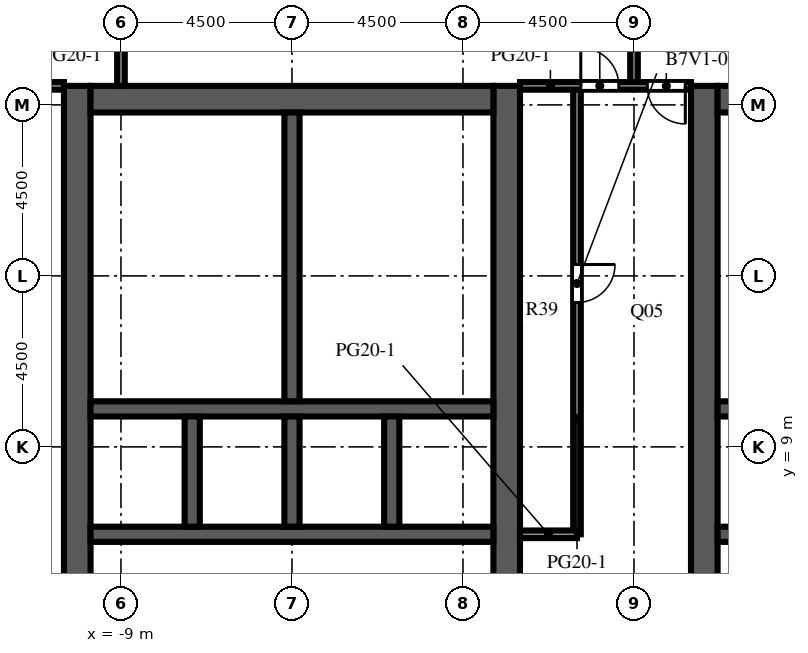
"""IFC4 building model, lengths in metres.
Left out: names, types, materials, properties, quantities, classifications, styles, units other than length and angle.
Written with IfcOpenShell. Run it as: python <this file> out.ifc"""

import sys

from ifc_helpers import new_model, si_unit, direction, frame, frame_2d, origin, place, context, subcontext, project, spatial, rectangle, extrude, element, fill, save


model = new_model("IFC4")
c1 = context("Model", 3, precision=1e-05, world=origin(), true_north=direction((0.0, 1.0)))
c2 = subcontext(c1, "Body", "Model", "MODEL_VIEW")
j1 = project(units=[si_unit("LENGTHUNIT", "METRE"), si_unit("PLANEANGLEUNIT", "RADIAN")], contexts=[c1])
p1 = place(None, origin())
s1 = spatial("IfcSite", under=j1, at=p1, CompositionType="ELEMENT")
p2 = place(p1, origin())
s2 = spatial("IfcBuilding", under=s1, at=p2, CompositionType="ELEMENT")
p3 = place(p2, frame((0.0, 0.0, 248.0)))
s3 = spatial("IfcBuildingStorey", under=s2, at=p3, CompositionType="ELEMENT", Elevation=248.0)
p4 = place(p3, frame((-10.15, -9.0, 0.0), z_axis=(0.0, 0.0, 1.0), x_axis=(0.0, 1.0, 0.0)))
e1 = element("IfcWall", 1, at=p4, inside=s3, PredefinedType="SHEAR", context=c2, shape_type="SweptSolid", body=[
    extrude(rectangle(XDim=27.5, YDim=0.7, at=frame_2d((13.75, 0.0))), origin(), (0.0, 0.0, 1.0), 4.1),
])
p5 = place(p4, frame((12.55, 0.0, 0.0)))
e2 = element("IfcOpeningElement", 2, at=p5, cuts=e1, PredefinedType="OPENING", context=c2, shape_type="SweptSolid", body=[
    extrude(rectangle(XDim=2.4, YDim=2.4, at=frame_2d((1.2, 1.2))), frame((0.0, 0.36, 0.0), z_axis=(0.0, -1.0, 0.0), x_axis=(1.0, 0.0, 0.0)), (0.0, 0.0, 1.0), 0.72),
])
p6 = place(p4, frame((6.825, 0.0, 0.0)))
e3 = element("IfcOpeningElement", 3, at=p6, cuts=e1, PredefinedType="OPENING", context=c2, shape_type="SweptSolid", body=[
    extrude(rectangle(XDim=1.2, YDim=2.1, at=frame_2d((0.6, 1.05))), frame((0.0, 0.36, 0.0), z_axis=(0.0, -1.0, 0.0), x_axis=(1.0, 0.0, 0.0)), (0.0, 0.0, 1.0), 0.72),
])
p7 = place(p4, frame((19.475, 0.0, 0.0)))
e4 = element("IfcOpeningElement", 4, at=p7, cuts=e1, PredefinedType="OPENING", context=c2, shape_type="SweptSolid", body=[
    extrude(rectangle(XDim=1.2, YDim=2.1, at=frame_2d((0.6, 1.05))), frame((0.0, 0.36, 0.0), z_axis=(0.0, -1.0, 0.0), x_axis=(1.0, 0.0, 0.0)), (0.0, 0.0, 1.0), 0.72),
])
p8 = place(p3, frame((1.15, -9.0, 0.0), z_axis=(0.0, 0.0, 1.0), x_axis=(0.0, 1.0, 0.0)))
e5 = element("IfcWall", 5, at=p8, inside=s3, PredefinedType="SHEAR", context=c2, shape_type="SweptSolid", body=[
    extrude(rectangle(XDim=27.5, YDim=0.7, at=frame_2d((13.75, 0.0))), origin(), (0.0, 0.0, 1.0), 4.1),
])
p9 = place(p8, frame((12.55, 0.0, 0.0)))
e6 = element("IfcOpeningElement", 6, at=p9, cuts=e5, PredefinedType="OPENING", context=c2, shape_type="SweptSolid", body=[
    extrude(rectangle(XDim=2.4, YDim=2.4, at=frame_2d((1.2, 1.2))), frame((0.0, 0.36, 0.0), z_axis=(0.0, -1.0, 0.0), x_axis=(1.0, 0.0, 0.0)), (0.0, 0.0, 1.0), 0.72),
])
p10 = place(p8, frame((3.9, 0.0, 0.0)))
e7 = element("IfcOpeningElement", 7, at=p10, cuts=e5, PredefinedType="OPENING", context=c2, shape_type="SweptSolid", body=[
    extrude(rectangle(XDim=1.2, YDim=2.1, at=frame_2d((0.6, 1.05))), frame((0.0, 0.36, 0.0), z_axis=(0.0, -1.0, 0.0), x_axis=(1.0, 0.0, 0.0)), (0.0, 0.0, 1.0), 0.72),
])
p11 = place(p8, frame((22.4, 0.0, 0.0)))
e8 = element("IfcOpeningElement", 8, at=p11, cuts=e5, PredefinedType="OPENING", context=c2, shape_type="SweptSolid", body=[
    extrude(rectangle(XDim=1.2, YDim=2.1, at=frame_2d((0.6, 1.05))), frame((0.0, 0.36, 0.0), z_axis=(0.0, -1.0, 0.0), x_axis=(1.0, 0.0, 0.0)), (0.0, 0.0, 1.0), 0.72),
])
p12 = place(p3, frame((-9.8, 18.15, 0.0), z_axis=(0.0, 0.0, 1.0), x_axis=(1.0, 0.0, 0.0)))
e9 = element("IfcWall", 9, at=p12, inside=s3, PredefinedType="SHEAR", context=c2, shape_type="SweptSolid", body=[
    extrude(rectangle(XDim=10.6, YDim=0.7, at=frame_2d((5.3, 0.0))), origin(), (0.0, 0.0, 1.0), 4.1),
])
p13 = place(p3, frame((-9.8, 6.7, 0.0), z_axis=(0.0, 0.0, 1.0), x_axis=(1.0, 0.0, 0.0)))
e10 = element("IfcWall", 10, at=p13, inside=s3, PredefinedType="SHEAR", context=c2, shape_type="SweptSolid", body=[
    extrude(rectangle(XDim=10.6, YDim=0.4, at=frame_2d((5.3, 0.0))), origin(), (0.0, 0.0, 1.0), 4.1),
])
p14 = place(p13, frame((3.438, 0.0, 0.0)))
e11 = element("IfcOpeningElement", 11, at=p14, cuts=e10, PredefinedType="OPENING", context=c2, shape_type="SweptSolid", body=[
    extrude(rectangle(XDim=1.1, YDim=2.1, at=frame_2d((0.55, 1.05))), frame((0.0, 0.21, 0.0), z_axis=(0.0, -1.0, 0.0), x_axis=(1.0, 0.0, 0.0)), (0.0, 0.0, 1.0), 0.42),
])
p15 = place(p13, frame((6.062, 0.0, 0.0)))
e12 = element("IfcOpeningElement", 12, at=p15, cuts=e10, PredefinedType="OPENING", context=c2, shape_type="SweptSolid", body=[
    extrude(rectangle(XDim=1.1, YDim=2.1, at=frame_2d((0.55, 1.05))), frame((0.0, 0.21, 0.0), z_axis=(0.0, -1.0, 0.0), x_axis=(1.0, 0.0, 0.0)), (0.0, 0.0, 1.0), 0.42),
])
p16 = place(p13, frame((8.812, 0.0, 0.0)))
e13 = element("IfcOpeningElement", 13, at=p16, cuts=e10, PredefinedType="OPENING", context=c2, shape_type="SweptSolid", body=[
    extrude(rectangle(XDim=1.1, YDim=2.1, at=frame_2d((0.55, 1.05))), frame((0.0, 0.21, 0.0), z_axis=(0.0, -1.0, 0.0), x_axis=(1.0, 0.0, 0.0)), (0.0, 0.0, 1.0), 0.42),
])
p17 = place(p13, frame((0.738, 0.0, 0.0)))
e14 = element("IfcOpeningElement", 14, at=p17, cuts=e10, PredefinedType="OPENING", context=c2, shape_type="SweptSolid", body=[
    extrude(rectangle(XDim=1.0, YDim=2.1, at=frame_2d((0.5, 1.05))), frame((0.0, 0.21, 0.0), z_axis=(0.0, -1.0, 0.0), x_axis=(1.0, 0.0, 0.0)), (0.0, 0.0, 1.0), 0.42),
])
p18 = place(p3, frame((-9.8, 10.0, 0.0), z_axis=(0.0, 0.0, 1.0), x_axis=(1.0, 0.0, 0.0)))
e15 = element("IfcWall", 15, at=p18, inside=s3, PredefinedType="SHEAR", context=c2, shape_type="SweptSolid", body=[
    extrude(rectangle(XDim=10.6, YDim=0.4, at=frame_2d((5.3, 0.0))), origin(), (0.0, 0.0, 1.0), 4.1),
])
for number, where, z_axis, x_axis in (
    (16, (-7.125, 6.9, 0.0), (0.0, 0.0, 1.0), (0.0, 1.0, 0.0)),
    (17, (-4.5, 6.9, 0.0), (0.0, 0.0, 1.0), (0.0, 1.0, 0.0)),
    (18, (-1.875, 6.9, 0.0), (0.0, 0.0, 1.0), (0.0, 1.0, 0.0)),
):
    element("IfcWall", number, at=place(p3, frame(where, z_axis=z_axis, x_axis=x_axis)), inside=s3, PredefinedType="SHEAR", context=c2, shape_type="SweptSolid", body=[
        extrude(rectangle(XDim=2.9, YDim=0.4, at=frame_2d((1.45, 0.0))), origin(), (0.0, 0.0, 1.0), 4.1),
    ])
p19 = place(p3, frame((-4.5, 10.2, 0.0), z_axis=(0.0, 0.0, 1.0), x_axis=(0.0, 1.0, 0.0)))
e19 = element("IfcWall", 19, at=p19, inside=s3, PredefinedType="SHEAR", context=c2, shape_type="SweptSolid", body=[
    extrude(rectangle(XDim=7.6, YDim=0.4, at=frame_2d((3.8, 0.0))), origin(), (0.0, 0.0, 1.0), 4.1),
])
p20 = place(p3, frame((6.35, -9.0, 0.0), z_axis=(0.0, 0.0, 1.0), x_axis=(0.0, 1.0, 0.0)))
e20 = element("IfcWall", 20, at=p20, inside=s3, PredefinedType="SHEAR", context=c2, shape_type="SweptSolid", body=[
    extrude(rectangle(XDim=27.5, YDim=0.7, at=frame_2d((13.75, 0.0))), origin(), (0.0, 0.0, 1.0), 4.1),
])
p21 = place(p20, frame((12.55, 0.0, 0.0)))
e21 = element("IfcOpeningElement", 21, at=p21, cuts=e20, PredefinedType="OPENING", context=c2, shape_type="SweptSolid", body=[
    extrude(rectangle(XDim=2.4, YDim=2.4, at=frame_2d((1.2, 1.2))), frame((0.0, 0.36, 0.0), z_axis=(0.0, -1.0, 0.0), x_axis=(1.0, 0.0, 0.0)), (0.0, 0.0, 1.0), 0.72),
])
p22 = place(p20, frame((3.9, 0.0, 0.0)))
e22 = element("IfcOpeningElement", 22, at=p22, cuts=e20, PredefinedType="OPENING", context=c2, shape_type="SweptSolid", body=[
    extrude(rectangle(XDim=1.2, YDim=2.1, at=frame_2d((0.6, 1.05))), frame((0.0, 0.36, 0.0), z_axis=(0.0, -1.0, 0.0), x_axis=(1.0, 0.0, 0.0)), (0.0, 0.0, 1.0), 0.72),
])
p23 = place(p20, frame((22.4, 0.0, 0.0)))
e23 = element("IfcOpeningElement", 23, at=p23, cuts=e20, PredefinedType="OPENING", context=c2, shape_type="SweptSolid", body=[
    extrude(rectangle(XDim=1.2, YDim=2.1, at=frame_2d((0.6, 1.05))), frame((0.0, 0.36, 0.0), z_axis=(0.0, -1.0, 0.0), x_axis=(1.0, 0.0, 0.0)), (0.0, 0.0, 1.0), 0.72),
])
p24 = place(p3, frame((6.7, 18.15, 0.0), z_axis=(0.0, 0.0, 1.0), x_axis=(1.0, 0.0, 0.0)))
e24 = element("IfcWall", 24, at=p24, inside=s3, PredefinedType="SHEAR", context=c2, shape_type="SweptSolid", body=[
    extrude(rectangle(XDim=10.6, YDim=0.7, at=frame_2d((5.3, 0.0))), origin(), (0.0, 0.0, 1.0), 4.1),
])
p25 = place(p3, frame((6.7, 6.7, 0.0), z_axis=(0.0, 0.0, 1.0), x_axis=(1.0, 0.0, 0.0)))
e25 = element("IfcWall", 25, at=p25, inside=s3, PredefinedType="SHEAR", context=c2, shape_type="SweptSolid", body=[
    extrude(rectangle(XDim=10.6, YDim=0.4, at=frame_2d((5.3, 0.0))), origin(), (0.0, 0.0, 1.0), 4.1),
])
p26 = place(p25, frame((3.438, 0.0, 0.0)))
e26 = element("IfcOpeningElement", 26, at=p26, cuts=e25, PredefinedType="OPENING", context=c2, shape_type="SweptSolid", body=[
    extrude(rectangle(XDim=1.1, YDim=2.1, at=frame_2d((0.55, 1.05))), frame((0.0, 0.21, 0.0), z_axis=(0.0, -1.0, 0.0), x_axis=(1.0, 0.0, 0.0)), (0.0, 0.0, 1.0), 0.42),
])
p27 = place(p25, frame((6.062, 0.0, 0.0)))
e27 = element("IfcOpeningElement", 27, at=p27, cuts=e25, PredefinedType="OPENING", context=c2, shape_type="SweptSolid", body=[
    extrude(rectangle(XDim=1.1, YDim=2.1, at=frame_2d((0.55, 1.05))), frame((0.0, 0.21, 0.0), z_axis=(0.0, -1.0, 0.0), x_axis=(1.0, 0.0, 0.0)), (0.0, 0.0, 1.0), 0.42),
])
p28 = place(p25, frame((8.812, 0.0, 0.0)))
e28 = element("IfcOpeningElement", 28, at=p28, cuts=e25, PredefinedType="OPENING", context=c2, shape_type="SweptSolid", body=[
    extrude(rectangle(XDim=1.1, YDim=2.1, at=frame_2d((0.55, 1.05))), frame((0.0, 0.21, 0.0), z_axis=(0.0, -1.0, 0.0), x_axis=(1.0, 0.0, 0.0)), (0.0, 0.0, 1.0), 0.42),
])
p29 = place(p25, frame((0.738, 0.0, 0.0)))
e29 = element("IfcOpeningElement", 29, at=p29, cuts=e25, PredefinedType="OPENING", context=c2, shape_type="SweptSolid", body=[
    extrude(rectangle(XDim=1.0, YDim=2.1, at=frame_2d((0.5, 1.05))), frame((0.0, 0.21, 0.0), z_axis=(0.0, -1.0, 0.0), x_axis=(1.0, 0.0, 0.0)), (0.0, 0.0, 1.0), 0.42),
])
p30 = place(p3, frame((6.7, 10.0, 0.0), z_axis=(0.0, 0.0, 1.0), x_axis=(1.0, 0.0, 0.0)))
e30 = element("IfcWall", 30, at=p30, inside=s3, PredefinedType="SHEAR", context=c2, shape_type="SweptSolid", body=[
    extrude(rectangle(XDim=10.6, YDim=0.4, at=frame_2d((5.3, 0.0))), origin(), (0.0, 0.0, 1.0), 4.1),
])
p31 = place(p3, frame((-0.6, 10.2, 0.0), z_axis=(0.0, 0.0, 1.0), x_axis=(0.0, 1.0, 0.0)))
e31 = element("IfcWall", 31, at=p31, inside=s3, PredefinedType="PARTITIONING", context=c2, shape_type="SweptSolid", body=[
    extrude(rectangle(XDim=2.28, YDim=0.1, at=frame_2d((1.14, 0.0))), origin(), (0.0, 0.0, 1.0), 3.65),
])
p32 = place(p31, frame((0.64, 0.0, 0.0)))
e32 = element("IfcOpeningElement", 32, at=p32, cuts=e31, PredefinedType="OPENING", context=c2, shape_type="SweptSolid", body=[
    extrude(rectangle(XDim=1.0, YDim=2.1, at=frame_2d((0.5, 1.05))), frame((0.0, 0.06, 0.0), z_axis=(0.0, -1.0, 0.0), x_axis=(1.0, 0.0, 0.0)), (0.0, 0.0, 1.0), 0.12),
])
p33 = place(p3, frame((-0.6, 12.48, 0.0), z_axis=(0.0, 0.0, 1.0), x_axis=(0.0, 1.0, 0.0)))
e33 = element("IfcWall", 33, at=p33, inside=s3, PredefinedType="PARTITIONING", context=c2, shape_type="SweptSolid", body=[
    extrude(rectangle(XDim=2.432, YDim=0.1, at=frame_2d((1.216, 0.0))), origin(), (0.0, 0.0, 1.0), 3.65),
])
p34 = place(p33, frame((0.716, 0.0, 0.0)))
e34 = element("IfcOpeningElement", 34, at=p34, cuts=e33, PredefinedType="OPENING", context=c2, shape_type="SweptSolid", body=[
    extrude(rectangle(XDim=1.0, YDim=2.1, at=frame_2d((0.5, 1.05))), frame((0.0, 0.06, 0.0), z_axis=(0.0, -1.0, 0.0), x_axis=(1.0, 0.0, 0.0)), (0.0, 0.0, 1.0), 0.12),
])
p35 = place(p3, frame((-0.6, 14.912, 0.0), z_axis=(0.0, 0.0, 1.0), x_axis=(0.0, 1.0, 0.0)))
e35 = element("IfcWall", 35, at=p35, inside=s3, PredefinedType="PARTITIONING", context=c2, shape_type="SweptSolid", body=[
    extrude(rectangle(XDim=2.888, YDim=0.1, at=frame_2d((1.444, 0.0))), origin(), (0.0, 0.0, 1.0), 3.65),
])
p36 = place(p35, frame((0.944, 0.0, 0.0)))
e36 = element("IfcOpeningElement", 36, at=p36, cuts=e35, PredefinedType="OPENING", context=c2, shape_type="SweptSolid", body=[
    extrude(rectangle(XDim=1.0, YDim=2.1, at=frame_2d((0.5, 1.05))), frame((0.0, 0.06, 0.0), z_axis=(0.0, -1.0, 0.0), x_axis=(1.0, 0.0, 0.0)), (0.0, 0.0, 1.0), 0.12),
])
for number, where, z_axis, x_axis in (
    (37, (-4.3, 12.48, 0.0), (0.0, 0.0, 1.0), (1.0, 0.0, 0.0)),
    (38, (-4.3, 14.912, 0.0), (0.0, 0.0, 1.0), (1.0, 0.0, 0.0)),
):
    element("IfcWall", number, at=place(p3, frame(where, z_axis=z_axis, x_axis=x_axis)), inside=s3, PredefinedType="PARTITIONING", context=c2, shape_type="SweptSolid", body=[
        extrude(rectangle(XDim=3.7, YDim=0.1, at=frame_2d((1.85, 0.0))), origin(), (0.0, 0.0, 1.0), 3.65),
    ])
p37 = place(p3, frame((-9.0, 18.5, 0.0), z_axis=(0.0, 0.0, 1.0), x_axis=(0.0, 1.0, 0.0)))
e39 = element("IfcWall", 39, at=p37, inside=s3, PredefinedType="PARTITIONING", context=c2, shape_type="SweptSolid", body=[
    extrude(rectangle(XDim=3.5, YDim=0.2, at=frame_2d((1.75, 0.0))), origin(), (0.0, 0.0, 1.0), 3.65),
])
p38 = place(p3, frame((3.0, 6.7, 0.0), z_axis=(0.0, 0.0, 1.0), x_axis=(0.0, 1.0, 0.0)))
e40 = element("IfcWall", 40, at=p38, inside=s3, PredefinedType="PARTITIONING", context=c2, shape_type="SweptSolid", body=[
    extrude(rectangle(XDim=11.8, YDim=0.2, at=frame_2d((5.9, 0.0))), origin(), (0.0, 0.0, 1.0), 3.65),
])
p39 = place(p38, frame((6.1, 0.0, 0.0)))
e41 = element("IfcOpeningElement", 41, at=p39, cuts=e40, PredefinedType="OPENING", context=c2, shape_type="SweptSolid", body=[
    extrude(rectangle(XDim=1.0, YDim=2.1, at=frame_2d((0.5, 1.05))), frame((0.0, 0.11, 0.0), z_axis=(0.0, -1.0, 0.0), x_axis=(1.0, 0.0, 0.0)), (0.0, 0.0, 1.0), 0.22),
])
p40 = place(p3, frame((4.5, 18.5, 0.0), z_axis=(0.0, 0.0, 1.0), x_axis=(0.0, 1.0, 0.0)))
e42 = element("IfcWall", 42, at=p40, inside=s3, PredefinedType="PARTITIONING", context=c2, shape_type="SweptSolid", body=[
    extrude(rectangle(XDim=12.6, YDim=0.2, at=frame_2d((6.3, 0.0))), origin(), (0.0, 0.0, 1.0), 3.65),
])
p41 = place(p3, frame((1.5, 6.7, 0.0), z_axis=(0.0, 0.0, 1.0), x_axis=(1.0, 0.0, 0.0)))
e43 = element("IfcWall", 43, at=p41, inside=s3, PredefinedType="PARTITIONING", context=c2, shape_type="SweptSolid", body=[
    extrude(rectangle(XDim=1.5, YDim=0.2, at=frame_2d((0.75, 0.0))), origin(), (0.0, 0.0, 1.0), 3.65),
])
p42 = place(p3, frame((-13.5, 18.5, 0.0), z_axis=(0.0, 0.0, 1.0), x_axis=(1.0, 0.0, 0.0)))
e44 = element("IfcWall", 44, at=p42, inside=s3, PredefinedType="PARTITIONING", context=c2, shape_type="SweptSolid", body=[
    extrude(rectangle(XDim=3.0, YDim=0.2, at=frame_2d((1.5, 0.0))), origin(), (0.0, 0.0, 1.0), 3.65),
])
p43 = place(p42, frame((0.85, 0.0, 0.0)))
e45 = element("IfcOpeningElement", 45, at=p43, cuts=e44, PredefinedType="OPENING", context=c2, shape_type="SweptSolid", body=[
    extrude(rectangle(XDim=1.0, YDim=2.1, at=frame_2d((0.5, 1.05))), frame((0.0, 0.11, 0.0), z_axis=(0.0, -1.0, 0.0), x_axis=(1.0, 0.0, 0.0)), (0.0, 0.0, 1.0), 0.22),
])
p44 = place(p3, frame((1.5, 18.5, 0.0), z_axis=(0.0, 0.0, 1.0), x_axis=(1.0, 0.0, 0.0)))
e46 = element("IfcWall", 46, at=p44, inside=s3, PredefinedType="PARTITIONING", context=c2, shape_type="SweptSolid", body=[
    extrude(rectangle(XDim=4.5, YDim=0.2, at=frame_2d((2.25, 0.0))), origin(), (0.0, 0.0, 1.0), 3.65),
])
p45 = place(p44, frame((1.6, 0.0, 0.0)))
e47 = element("IfcOpeningElement", 47, at=p45, cuts=e46, PredefinedType="OPENING", context=c2, shape_type="SweptSolid", body=[
    extrude(rectangle(XDim=1.0, YDim=2.1, at=frame_2d((0.5, 1.05))), frame((0.0, 0.11, 0.0), z_axis=(0.0, -1.0, 0.0), x_axis=(1.0, 0.0, 0.0)), (0.0, 0.0, 1.0), 0.22),
])
p46 = place(p44, frame((3.35, 0.0, 0.0)))
e48 = element("IfcOpeningElement", 48, at=p46, cuts=e46, PredefinedType="OPENING", context=c2, shape_type="SweptSolid", body=[
    extrude(rectangle(XDim=1.0, YDim=2.1, at=frame_2d((0.5, 1.05))), frame((0.0, 0.11, 0.0), z_axis=(0.0, -1.0, 0.0), x_axis=(1.0, 0.0, 0.0)), (0.0, 0.0, 1.0), 0.22),
])
p47 = place(p14, origin())
e49 = element("IfcDoor", 49, at=p47, inside=s3, OperationType="DOUBLE_DOOR_SLIDING", PredefinedType="DOOR", context=c2, shape_type="SweptSolid", body=[
    extrude(rectangle(XDim=1.1, YDim=2.1, at=frame_2d((0.55, 1.05))), frame((0.0, 0.025, 0.0), z_axis=(0.0, -1.0, 0.0), x_axis=(1.0, 0.0, 0.0)), (0.0, 0.0, 1.0), 0.05),
])
fill(e11, e49)
p48 = place(p15, origin())
e50 = element("IfcDoor", 50, at=p48, inside=s3, OperationType="DOUBLE_DOOR_SLIDING", PredefinedType="DOOR", context=c2, shape_type="SweptSolid", body=[
    extrude(rectangle(XDim=1.1, YDim=2.1, at=frame_2d((0.55, 1.05))), frame((0.0, 0.025, 0.0), z_axis=(0.0, -1.0, 0.0), x_axis=(1.0, 0.0, 0.0)), (0.0, 0.0, 1.0), 0.05),
])
fill(e12, e50)
p49 = place(p16, origin())
e51 = element("IfcDoor", 51, at=p49, inside=s3, OperationType="DOUBLE_DOOR_SLIDING", PredefinedType="DOOR", context=c2, shape_type="SweptSolid", body=[
    extrude(rectangle(XDim=1.1, YDim=2.1, at=frame_2d((0.55, 1.05))), frame((0.0, 0.025, 0.0), z_axis=(0.0, -1.0, 0.0), x_axis=(1.0, 0.0, 0.0)), (0.0, 0.0, 1.0), 0.05),
])
fill(e13, e51)
p50 = place(p5, origin())
e52 = element("IfcDoor", 52, at=p50, inside=s3, OperationType="DOUBLE_DOOR_DOUBLE_SWING", PredefinedType="DOOR", context=c2, shape_type="SweptSolid", body=[
    extrude(rectangle(XDim=2.4, YDim=2.4, at=frame_2d((1.2, 1.2))), frame((0.0, 0.025, 0.0), z_axis=(0.0, -1.0, 0.0), x_axis=(1.0, 0.0, 0.0)), (0.0, 0.0, 1.0), 0.05),
])
fill(e2, e52)
p51 = place(p9, origin())
e53 = element("IfcDoor", 53, at=p51, inside=s3, OperationType="DOUBLE_DOOR_DOUBLE_SWING", PredefinedType="DOOR", context=c2, shape_type="SweptSolid", body=[
    extrude(rectangle(XDim=2.4, YDim=2.4, at=frame_2d((1.2, 1.2))), frame((0.0, 0.025, 0.0), z_axis=(0.0, -1.0, 0.0), x_axis=(1.0, 0.0, 0.0)), (0.0, 0.0, 1.0), 0.05),
])
fill(e6, e53)
p52 = place(p21, origin())
e54 = element("IfcDoor", 54, at=p52, inside=s3, OperationType="DOUBLE_DOOR_DOUBLE_SWING", PredefinedType="DOOR", context=c2, shape_type="SweptSolid", body=[
    extrude(rectangle(XDim=2.4, YDim=2.4, at=frame_2d((1.2, 1.2))), frame((0.0, 0.025, 0.0), z_axis=(0.0, -1.0, 0.0), x_axis=(1.0, 0.0, 0.0)), (0.0, 0.0, 1.0), 0.05),
])
fill(e21, e54)
p53 = place(p7, origin())
e55 = element("IfcDoor", 55, at=p53, inside=s3, OperationType="SINGLE_SWING_LEFT", PredefinedType="DOOR", context=c2, shape_type="SweptSolid", body=[
    extrude(rectangle(XDim=1.2, YDim=2.1, at=frame_2d((0.6, 1.05))), frame((0.0, 0.025, 0.0), z_axis=(0.0, -1.0, 0.0), x_axis=(1.0, 0.0, 0.0)), (0.0, 0.0, 1.0), 0.05),
])
fill(e4, e55)
p54 = place(p17, origin())
e56 = element("IfcDoor", 56, at=p54, inside=s3, OperationType="SINGLE_SWING_LEFT", PredefinedType="DOOR", context=c2, shape_type="SweptSolid", body=[
    extrude(rectangle(XDim=1.0, YDim=2.1, at=frame_2d((0.5, 1.05))), frame((0.0, 0.025, 0.0), z_axis=(0.0, -1.0, 0.0), x_axis=(1.0, 0.0, 0.0)), (0.0, 0.0, 1.0), 0.05),
])
fill(e14, e56)
p55 = place(p11, origin())
e57 = element("IfcDoor", 57, at=p55, inside=s3, OperationType="SINGLE_SWING_LEFT", PredefinedType="DOOR", context=c2, shape_type="SweptSolid", body=[
    extrude(rectangle(XDim=1.2, YDim=2.1, at=frame_2d((0.6, 1.05))), frame((0.0, 0.325, 0.0), z_axis=(0.0, -1.0, 0.0), x_axis=(1.0, 0.0, 0.0)), (0.0, 0.0, 1.0), 0.05),
])
fill(e8, e57)
p56 = place(p32, origin())
e58 = element("IfcDoor", 58, at=p56, inside=s3, OperationType="SINGLE_SWING_RIGHT", PredefinedType="DOOR", context=c2, shape_type="SweptSolid", body=[
    extrude(rectangle(XDim=1.0, YDim=2.1, at=frame_2d((0.5, 1.05))), frame((0.0, 0.025, 0.0), z_axis=(0.0, -1.0, 0.0), x_axis=(1.0, 0.0, 0.0)), (0.0, 0.0, 1.0), 0.05),
])
fill(e32, e58)
p57 = place(p34, origin())
e59 = element("IfcDoor", 59, at=p57, inside=s3, OperationType="SINGLE_SWING_LEFT", PredefinedType="DOOR", context=c2, shape_type="SweptSolid", body=[
    extrude(rectangle(XDim=1.0, YDim=2.1, at=frame_2d((0.5, 1.05))), frame((0.0, 0.025, 0.0), z_axis=(0.0, -1.0, 0.0), x_axis=(1.0, 0.0, 0.0)), (0.0, 0.0, 1.0), 0.05),
])
fill(e34, e59)
p58 = place(p36, origin())
e60 = element("IfcDoor", 60, at=p58, inside=s3, OperationType="SINGLE_SWING_RIGHT", PredefinedType="DOOR", context=c2, shape_type="SweptSolid", body=[
    extrude(rectangle(XDim=1.0, YDim=2.1, at=frame_2d((0.5, 1.05))), frame((0.0, 0.025, 0.0), z_axis=(0.0, -1.0, 0.0), x_axis=(1.0, 0.0, 0.0)), (0.0, 0.0, 1.0), 0.05),
])
fill(e36, e60)
p59 = place(p23, origin())
e61 = element("IfcDoor", 61, at=p59, inside=s3, OperationType="SINGLE_SWING_RIGHT", PredefinedType="DOOR", context=c2, shape_type="SweptSolid", body=[
    extrude(rectangle(XDim=1.2, YDim=2.1, at=frame_2d((0.6, 1.05))), frame((0.0, -0.275, 0.0), z_axis=(0.0, -1.0, 0.0), x_axis=(1.0, 0.0, 0.0)), (0.0, 0.0, 1.0), 0.05),
])
fill(e23, e61)
p60 = place(p39, origin())
e62 = element("IfcDoor", 62, at=p60, inside=s3, OperationType="SINGLE_SWING_RIGHT", PredefinedType="DOOR", context=c2, shape_type="SweptSolid", body=[
    extrude(rectangle(XDim=1.0, YDim=2.1, at=frame_2d((0.5, 1.05))), frame((0.0, 0.025, 0.0), z_axis=(0.0, -1.0, 0.0), x_axis=(1.0, 0.0, 0.0)), (0.0, 0.0, 1.0), 0.05),
])
fill(e41, e62)
p61 = place(p45, origin())
e63 = element("IfcDoor", 63, at=p61, inside=s3, OperationType="SINGLE_SWING_LEFT", PredefinedType="DOOR", context=c2, shape_type="SweptSolid", body=[
    extrude(rectangle(XDim=1.0, YDim=2.1, at=frame_2d((0.5, 1.05))), frame((0.0, 0.025, 0.0), z_axis=(0.0, -1.0, 0.0), x_axis=(1.0, 0.0, 0.0)), (0.0, 0.0, 1.0), 0.05),
])
fill(e47, e63)
p62 = place(p46, origin())
e64 = element("IfcDoor", 64, at=p62, inside=s3, OperationType="SINGLE_SWING_RIGHT", PredefinedType="DOOR", context=c2, shape_type="SweptSolid", body=[
    extrude(rectangle(XDim=1.0, YDim=2.1, at=frame_2d((0.5, 1.05))), frame((0.0, 0.025, 0.0), z_axis=(0.0, -1.0, 0.0), x_axis=(1.0, 0.0, 0.0)), (0.0, 0.0, 1.0), 0.05),
])
fill(e48, e64)
save(model, sys.argv[1])
